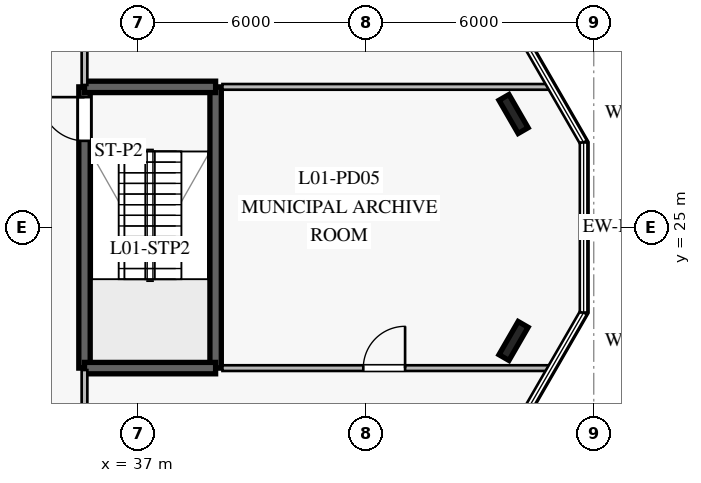
"""IFC4 building model, lengths in metres.
Left out: names, types, materials, properties, quantities, classifications, styles, units other than length and angle.
Written with IfcOpenShell. Run it as: python <this file> out.ifc"""

import sys

from ifc_helpers import new_model, si_unit, direction, frame, frame_2d, origin, origin_2d, place, context, subcontext, project, spatial, rectangle, i_section, extrude, element, fill, save


model = new_model("IFC4")
c1 = context("Model", 3, precision=1e-05, world=origin(), true_north=direction((0.0, 1.0)))
c2 = subcontext(c1, "Body", "Model", "MODEL_VIEW")
j1 = project(units=[si_unit("LENGTHUNIT", "METRE"), si_unit("PLANEANGLEUNIT", "RADIAN")], contexts=[c1])
p1 = place(None, origin())
s1 = spatial("IfcSite", under=j1, at=p1, CompositionType="ELEMENT")
p2 = place(p1, origin())
s2 = spatial("IfcBuilding", under=s1, at=p2, CompositionType="ELEMENT")
p3 = place(p2, frame((0.0, 0.0, 5.2)))
s3 = spatial("IfcBuildingStorey", under=s2, at=p3, CompositionType="ELEMENT", Elevation=5.2)
p4 = place(p3, frame((35.6, 21.3, 0.0), z_axis=(0.0, 0.0, 1.0), x_axis=(0.0, 1.0, 0.0)))
e1 = element("IfcWall", 1, at=p4, inside=s3, PredefinedType="SOLIDWALL", context=c2, shape_type="SweptSolid", body=[
    extrude(rectangle(XDim=7.4, YDim=0.3, at=frame_2d((3.7, 0.0))), origin(), (0.0, 0.0, 1.0), 4.34),
])
p5 = place(p4, frame((5.98, 0.0, 0.0)))
e2 = element("IfcOpeningElement", 2, at=p5, cuts=e1, PredefinedType="OPENING", context=c2, shape_type="SweptSolid", body=[
    extrude(rectangle(XDim=1.15, YDim=2.2, at=frame_2d((0.575, 1.1))), frame((0.0, 0.16, 0.0), z_axis=(0.0, -1.0, 0.0), x_axis=(1.0, 0.0, 0.0)), (0.0, 0.0, 1.0), 0.32),
])
p6 = place(p3, frame((39.05, 21.3, 0.0), z_axis=(0.0, 0.0, 1.0), x_axis=(0.0, 1.0, 0.0)))
e3 = element("IfcWall", 3, at=p6, inside=s3, PredefinedType="SOLIDWALL", context=c2, shape_type="SweptSolid", body=[
    extrude(rectangle(XDim=7.4, YDim=0.3, at=frame_2d((3.7, 0.0))), origin(), (0.0, 0.0, 1.0), 4.34),
])
for number, where, z_axis, x_axis in (
    (4, (35.6, 21.3, 0.0), (0.0, 0.0, 1.0), (1.0, 0.0, 0.0)),
    (5, (35.6, 28.7, 0.0), (0.0, 0.0, 1.0), (1.0, 0.0, 0.0)),
):
    element("IfcWall", number, at=place(p3, frame(where, z_axis=z_axis, x_axis=x_axis)), inside=s3, PredefinedType="SOLIDWALL", context=c2, shape_type="SweptSolid", body=[
        extrude(rectangle(XDim=3.45, YDim=0.3, at=frame_2d((1.725, 0.0))), origin(), (0.0, 0.0, 1.0), 4.34),
    ])
for number, where, z_axis, x_axis in (
    (6, (46.89, 27.986, 0.0), (0.0, 0.0, 1.0), (-0.5, 0.866, 0.0)),
    (7, (46.89, 22.014, 0.0), (0.0, 0.0, 1.0), (0.5, 0.866, 0.0)),
):
    element("IfcColumn", number, at=place(p3, frame(where, z_axis=z_axis, x_axis=x_axis)), inside=s3, PredefinedType="COLUMN", context=c2, shape_type="SweptSolid", body=[
        extrude(i_section(OverallWidth=0.302, OverallDepth=1.008, WebThickness=0.021, FlangeThickness=0.04, at=origin_2d()), origin(), (0.0, 0.0, 1.0), 4.6),
    ])
p7 = place(p3, frame((35.6, 15.0, 0.0), z_axis=(0.0, 0.0, 1.0), x_axis=(0.0, 1.0, 0.0)))
e8 = element("IfcWall", 8, at=p7, inside=s3, PredefinedType="PARTITIONING", context=c2, shape_type="SweptSolid", body=[
    extrude(rectangle(XDim=6.25, YDim=0.15, at=frame_2d((3.125, 0.0))), origin(), (0.0, 0.0, 1.0), 4.34),
])
p8 = place(p3, frame((35.6, 28.75, 0.0), z_axis=(0.0, 0.0, 1.0), x_axis=(0.0, 1.0, 0.0)))
e9 = element("IfcWall", 9, at=p8, inside=s3, PredefinedType="PARTITIONING", context=c2, shape_type="SweptSolid", body=[
    extrude(rectangle(XDim=6.25, YDim=0.15, at=frame_2d((3.125, 0.0))), origin(), (0.0, 0.0, 1.0), 3.79),
])
p9 = place(p3, frame((39.23, 21.3, 0.0), z_axis=(0.0, 0.0, 1.0), x_axis=(1.0, 0.0, 0.0)))
e10 = element("IfcWall", 10, at=p9, inside=s3, PredefinedType="PARTITIONING", context=c2, shape_type="SweptSolid", body=[
    extrude(rectangle(XDim=8.69, YDim=0.15, at=frame_2d((4.345, 0.0))), origin(), (0.0, 0.0, 1.0), 3.64),
])
p10 = place(p9, frame((3.706, 0.0, 0.0)))
e11 = element("IfcOpeningElement", 11, at=p10, cuts=e10, PredefinedType="OPENING", context=c2, shape_type="SweptSolid", body=[
    extrude(rectangle(XDim=1.1, YDim=2.2, at=frame_2d((0.55, 1.1))), frame((0.0, 0.085, 0.0), z_axis=(0.0, -1.0, 0.0), x_axis=(1.0, 0.0, 0.0)), (0.0, 0.0, 1.0), 0.17),
])
p11 = place(p3, frame((39.23, 28.7, 0.0), z_axis=(0.0, 0.0, 1.0), x_axis=(1.0, 0.0, 0.0)))
e12 = element("IfcWall", 12, at=p11, inside=s3, PredefinedType="PARTITIONING", context=c2, shape_type="SweptSolid", body=[
    extrude(rectangle(XDim=8.69, YDim=0.15, at=frame_2d((4.345, 0.0))), origin(), (0.0, 0.0, 1.0), 3.64),
])
p12 = place(p5, origin())
e13 = element("IfcDoor", 13, at=p12, inside=s3, OperationType="SINGLE_SWING_RIGHT", PredefinedType="DOOR", context=c2, shape_type="SweptSolid", body=[
    extrude(rectangle(XDim=1.15, YDim=2.2, at=frame_2d((0.575, 1.1))), frame((0.0, 0.025, 0.0), z_axis=(0.0, -1.0, 0.0), x_axis=(1.0, 0.0, 0.0)), (0.0, 0.0, 1.0), 0.05),
])
fill(e2, e13)
p13 = place(p10, origin())
e14 = element("IfcDoor", 14, at=p13, inside=s3, OperationType="SINGLE_SWING_RIGHT", PredefinedType="DOOR", context=c2, shape_type="SweptSolid", body=[
    extrude(rectangle(XDim=1.1, YDim=2.2, at=frame_2d((0.55, 1.1))), frame((0.0, 0.025, 0.0), z_axis=(0.0, -1.0, 0.0), x_axis=(1.0, 0.0, 0.0)), (0.0, 0.0, 1.0), 0.05),
])
fill(e11, e14)
save(model, sys.argv[1])
